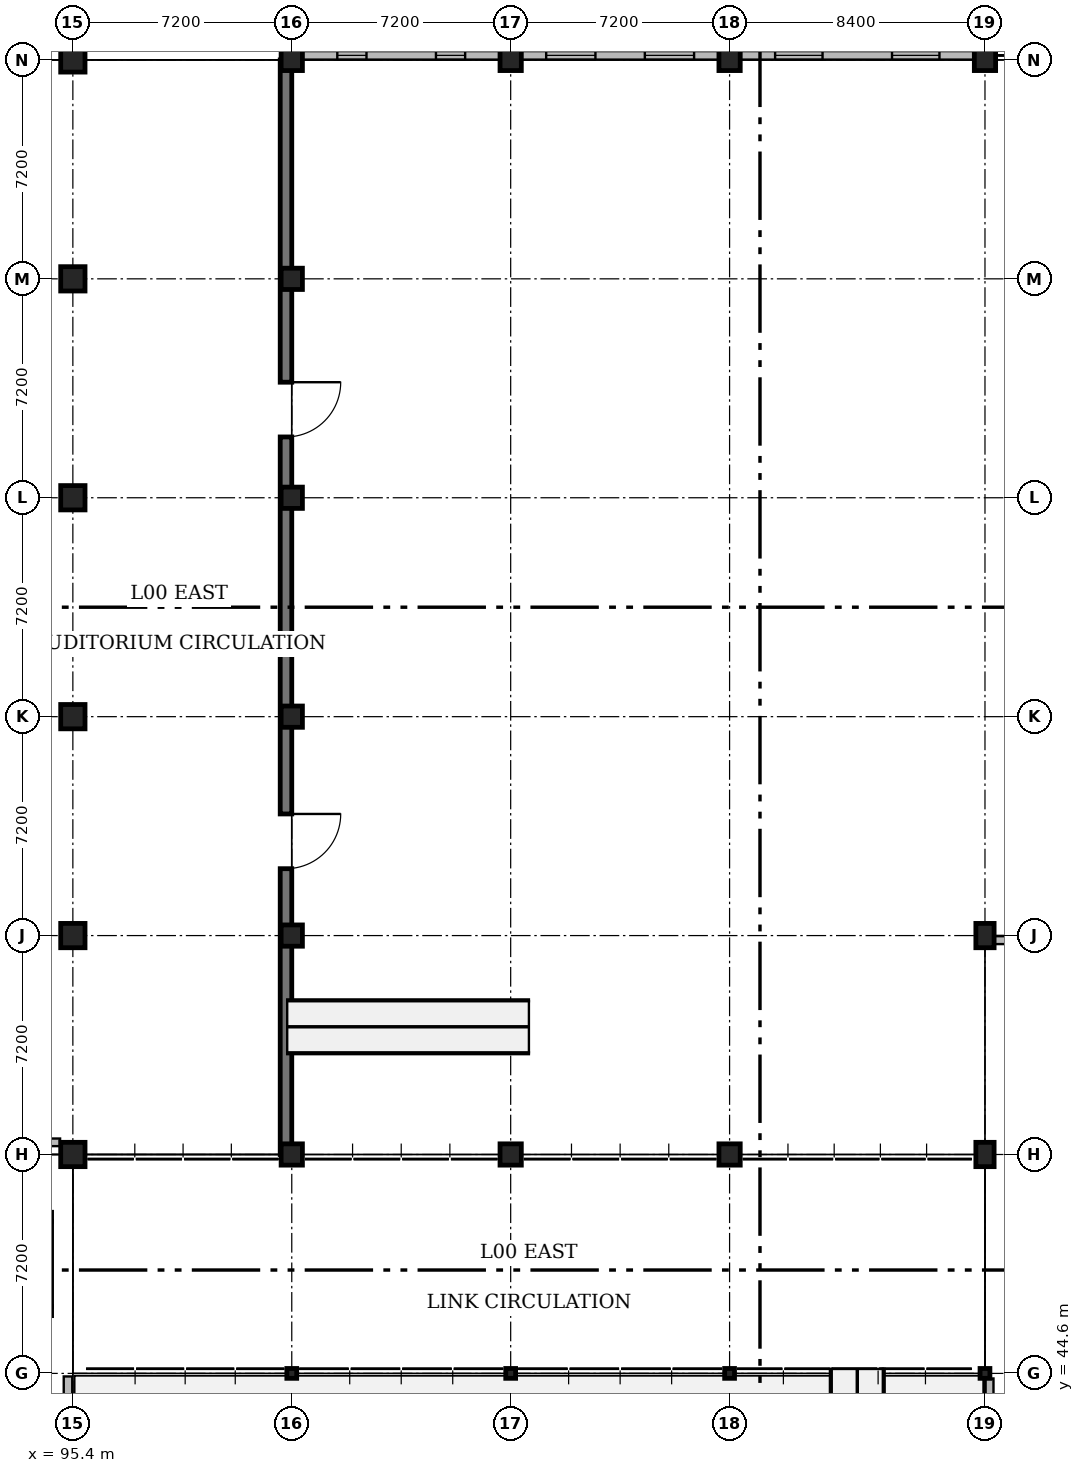
"""IFC4 building model, lengths in metres.
Left out: names, types, materials, properties, quantities, classifications, styles, units other than length and angle.
Written with IfcOpenShell. Run it as: python <this file> out.ifc"""

import sys

from ifc_helpers import new_model, si_unit, direction, frame, frame_2d, origin, origin_2d, place, context, subcontext, project, spatial, rectangle, hollow_circle, extrude, element, fill, save


model = new_model("IFC4")
c1 = context("Model", 3, precision=1e-05, world=origin(), true_north=direction((0.0, 1.0)))
c2 = subcontext(c1, "Body", "Model", "MODEL_VIEW")
j1 = project(units=[si_unit("LENGTHUNIT", "METRE"), si_unit("PLANEANGLEUNIT", "RADIAN")], contexts=[c1])
p1 = place(None, origin())
s1 = spatial("IfcSite", under=j1, at=p1, CompositionType="ELEMENT")
p2 = place(p1, origin())
s2 = spatial("IfcBuilding", under=s1, at=p2, CompositionType="ELEMENT")
p3 = place(p2, origin())
s3 = spatial("IfcBuildingStorey", under=s2, at=p3, CompositionType="ELEMENT", Elevation=0.0)
for number, where, z_axis, x_axis in (
    (1, (95.4, 51.8, 0.0), (0.0, 0.0, 1.0), (1.0, 0.0, 0.0)),
    (2, (95.4, 59.0, 0.0), (0.0, 0.0, 1.0), (1.0, 0.0, 0.0)),
    (3, (95.4, 66.2, 0.0), (0.0, 0.0, 1.0), (1.0, 0.0, 0.0)),
    (4, (95.4, 73.4, 0.0), (0.0, 0.0, 1.0), (1.0, 0.0, 0.0)),
    (5, (95.4, 80.6, 0.0), (0.0, 0.0, 1.0), (1.0, 0.0, 0.0)),
    (6, (95.4, 87.8, 0.0), (0.0, 0.0, 1.0), (1.0, 0.0, 0.0)),
):
    element("IfcColumn", number, at=place(p3, frame(where, z_axis=z_axis, x_axis=x_axis)), inside=s3, PredefinedType="COLUMN", context=c2, shape_type="SweptSolid", body=[
        extrude(rectangle(XDim=0.8, YDim=0.8, at=origin_2d()), origin(), (0.0, 0.0, 1.0), 4.8),
    ])
p4 = place(p3, frame((102.6, 44.6, 0.0), z_axis=(0.0, 0.0, 1.0), x_axis=(1.0, 0.0, 0.0)))
e7 = element("IfcColumn", 7, at=p4, inside=s3, PredefinedType="COLUMN", context=c2, shape_type="SweptSolid", body=[
    extrude(hollow_circle(Radius=0.162, WallThickness=0.012, at=origin_2d()), origin(), (0.0, 0.0, 1.0), 4.8),
])
for number, where, z_axis, x_axis in (
    (8, (102.6, 51.8, 0.0), (0.0, 0.0, 1.0), (1.0, 0.0, 0.0)),
    (9, (102.6, 59.0, 0.0), (0.0, 0.0, 1.0), (1.0, 0.0, 0.0)),
    (10, (102.6, 66.2, 0.0), (0.0, 0.0, 1.0), (1.0, 0.0, 0.0)),
    (11, (102.6, 73.4, 0.0), (0.0, 0.0, 1.0), (1.0, 0.0, 0.0)),
    (12, (102.6, 80.6, 0.0), (0.0, 0.0, 1.0), (1.0, 0.0, 0.0)),
    (13, (102.6, 87.8, 0.0), (0.0, 0.0, 1.0), (1.0, 0.0, 0.0)),
):
    element("IfcColumn", number, at=place(p3, frame(where, z_axis=z_axis, x_axis=x_axis)), inside=s3, PredefinedType="COLUMN", context=c2, shape_type="SweptSolid", body=[
        extrude(rectangle(XDim=0.7, YDim=0.7, at=origin_2d()), origin(), (0.0, 0.0, 1.0), 4.8),
    ])
p5 = place(p3, frame((109.8, 44.6, 0.0), z_axis=(0.0, 0.0, 1.0), x_axis=(1.0, 0.0, 0.0)))
e14 = element("IfcColumn", 14, at=p5, inside=s3, PredefinedType="COLUMN", context=c2, shape_type="SweptSolid", body=[
    extrude(hollow_circle(Radius=0.162, WallThickness=0.012, at=origin_2d()), origin(), (0.0, 0.0, 1.0), 4.8),
])
for number, where, z_axis, x_axis in (
    (15, (109.8, 51.8, 0.0), (0.0, 0.0, 1.0), (1.0, 0.0, 0.0)),
    (16, (109.8, 87.8, 0.0), (0.0, 0.0, 1.0), (1.0, 0.0, 0.0)),
):
    element("IfcColumn", number, at=place(p3, frame(where, z_axis=z_axis, x_axis=x_axis)), inside=s3, PredefinedType="COLUMN", context=c2, shape_type="SweptSolid", body=[
        extrude(rectangle(XDim=0.7, YDim=0.7, at=origin_2d()), origin(), (0.0, 0.0, 1.0), 4.8),
    ])
p6 = place(p3, frame((117.0, 44.6, 0.0), z_axis=(0.0, 0.0, 1.0), x_axis=(1.0, 0.0, 0.0)))
e17 = element("IfcColumn", 17, at=p6, inside=s3, PredefinedType="COLUMN", context=c2, shape_type="SweptSolid", body=[
    extrude(hollow_circle(Radius=0.162, WallThickness=0.012, at=origin_2d()), origin(), (0.0, 0.0, 1.0), 4.8),
])
for number, where, z_axis, x_axis in (
    (18, (117.0, 51.8, 0.0), (0.0, 0.0, 1.0), (1.0, 0.0, 0.0)),
    (19, (117.0, 87.8, 0.0), (0.0, 0.0, 1.0), (1.0, 0.0, 0.0)),
):
    element("IfcColumn", number, at=place(p3, frame(where, z_axis=z_axis, x_axis=x_axis)), inside=s3, PredefinedType="COLUMN", context=c2, shape_type="SweptSolid", body=[
        extrude(rectangle(XDim=0.7, YDim=0.7, at=origin_2d()), origin(), (0.0, 0.0, 1.0), 4.8),
    ])
p7 = place(p3, frame((125.4, 44.6, 0.0), z_axis=(0.0, 0.0, 1.0), x_axis=(1.0, 0.0, 0.0)))
e20 = element("IfcColumn", 20, at=p7, inside=s3, PredefinedType="COLUMN", context=c2, shape_type="SweptSolid", body=[
    extrude(hollow_circle(Radius=0.162, WallThickness=0.012, at=origin_2d()), origin(), (0.0, 0.0, 1.0), 4.8),
])
for number, where, z_axis, x_axis in (
    (21, (125.4, 51.8, 0.0), (0.0, 0.0, 1.0), (1.0, 0.0, 0.0)),
    (22, (125.4, 59.0, 0.0), (0.0, 0.0, 1.0), (1.0, 0.0, 0.0)),
):
    element("IfcColumn", number, at=place(p3, frame(where, z_axis=z_axis, x_axis=x_axis)), inside=s3, PredefinedType="COLUMN", context=c2, shape_type="SweptSolid", body=[
        extrude(rectangle(XDim=0.6, YDim=0.8, at=origin_2d()), origin(), (0.0, 0.0, 1.0), 4.8),
    ])
p8 = place(p3, frame((125.4, 87.8, 0.0), z_axis=(0.0, 0.0, 1.0), x_axis=(1.0, 0.0, 0.0)))
e23 = element("IfcColumn", 23, at=p8, inside=s3, PredefinedType="COLUMN", context=c2, shape_type="SweptSolid", body=[
    extrude(rectangle(XDim=0.7, YDim=0.7, at=origin_2d()), origin(), (0.0, 0.0, 1.0), 4.8),
])
p9 = place(p3, frame((95.24, 37.78, 0.0), z_axis=(0.0, 0.0, 1.0), x_axis=(0.0, 1.0, 0.0)))
e24 = element("IfcWall", 24, at=p9, inside=s3, PredefinedType="SOLIDWALL", context=c2, shape_type="SweptSolid", body=[
    extrude(rectangle(XDim=6.72, YDim=0.28, at=frame_2d((3.36, 0.0))), origin(), (0.0, 0.0, 1.0), 3.323),
])
p10 = place(p9, frame((0.905, 0.0, 0.95)))
e25 = element("IfcOpeningElement", 25, at=p10, cuts=e24, PredefinedType="OPENING", context=c2, shape_type="SweptSolid", body=[
    extrude(rectangle(XDim=1.55, YDim=1.8, at=frame_2d((0.775, 0.9))), frame((0.0, 0.16, 0.0), z_axis=(0.0, -1.0, 0.0), x_axis=(1.0, 0.0, 0.0)), (0.0, 0.0, 1.0), 0.32),
])
p11 = place(p9, frame((4.265, 0.0, 0.95)))
e26 = element("IfcOpeningElement", 26, at=p11, cuts=e24, PredefinedType="OPENING", context=c2, shape_type="SweptSolid", body=[
    extrude(rectangle(XDim=1.55, YDim=1.8, at=frame_2d((0.775, 0.9))), frame((0.0, 0.16, 0.0), z_axis=(0.0, -1.0, 0.0), x_axis=(1.0, 0.0, 0.0)), (0.0, 0.0, 1.0), 0.32),
])
p12 = place(p3, frame((125.705, 58.85, 0.0), z_axis=(0.0, 0.0, 1.0), x_axis=(1.0, 0.0, 0.0)))
e27 = element("IfcWall", 27, at=p12, inside=s3, PredefinedType="SOLIDWALL", context=c2, shape_type="SweptSolid", body=[
    extrude(rectangle(XDim=7.79, YDim=0.26, at=frame_2d((3.895, 0.0))), origin(), (0.0, 0.0, 1.0), 3.873),
])
p13 = place(p12, frame((1.482, 0.0, 0.95)))
e28 = element("IfcOpeningElement", 28, at=p13, cuts=e27, PredefinedType="OPENING", context=c2, shape_type="SweptSolid", body=[
    extrude(rectangle(XDim=0.93, YDim=1.8, at=frame_2d((0.465, 0.9))), frame((0.0, 0.15, 0.0), z_axis=(0.0, -1.0, 0.0), x_axis=(1.0, 0.0, 0.0)), (0.0, 0.0, 1.0), 0.3),
])
p14 = place(p12, frame((5.377, 0.0, 0.95)))
e29 = element("IfcOpeningElement", 29, at=p14, cuts=e27, PredefinedType="OPENING", context=c2, shape_type="SweptSolid", body=[
    extrude(rectangle(XDim=0.93, YDim=1.8, at=frame_2d((0.465, 0.9))), frame((0.0, 0.15, 0.0), z_axis=(0.0, -1.0, 0.0), x_axis=(1.0, 0.0, 0.0)), (0.0, 0.0, 1.0), 0.3),
])
p15 = place(p3, frame((125.55, 37.805, 0.0), z_axis=(0.0, 0.0, 1.0), x_axis=(0.0, 1.0, 0.0)))
e30 = element("IfcWall", 30, at=p15, inside=s3, PredefinedType="SOLIDWALL", context=c2, shape_type="SweptSolid", body=[
    extrude(rectangle(XDim=6.628, YDim=0.26, at=frame_2d((3.314, 0.0))), origin(), (0.0, 0.0, 1.0), 3.873),
])
p16 = place(p15, frame((0.847, 0.0, 0.95)))
e31 = element("IfcOpeningElement", 31, at=p16, cuts=e30, PredefinedType="OPENING", context=c2, shape_type="SweptSolid", body=[
    extrude(rectangle(XDim=1.62, YDim=2.0, at=frame_2d((0.81, 1.0))), frame((0.0, 0.15, 0.0), z_axis=(0.0, -1.0, 0.0), x_axis=(1.0, 0.0, 0.0)), (0.0, 0.0, 1.0), 0.3),
])
p17 = place(p15, frame((4.161, 0.0, 0.95)))
e32 = element("IfcOpeningElement", 32, at=p17, cuts=e30, PredefinedType="OPENING", context=c2, shape_type="SweptSolid", body=[
    extrude(rectangle(XDim=1.62, YDim=2.0, at=frame_2d((0.81, 1.0))), frame((0.0, 0.15, 0.0), z_axis=(0.0, -1.0, 0.0), x_axis=(1.0, 0.0, 0.0)), (0.0, 0.0, 1.0), 0.3),
])
p18 = place(p3, frame((102.41, 87.8, 0.0), z_axis=(0.0, 0.0, 1.0), x_axis=(0.0, -1.0, 0.0)))
e33 = element("IfcWall", 33, at=p18, inside=s3, PredefinedType="SOLIDWALL", context=c2, shape_type="SweptSolid", body=[
    extrude(rectangle(XDim=36.0, YDim=0.38, at=frame_2d((18.0, 0.0))), origin(), (0.0, 0.0, 1.0), 4.54),
])
p19 = place(p18, frame((10.6, 0.0, 0.0)))
e34 = element("IfcOpeningElement", 34, at=p19, cuts=e33, PredefinedType="OPENING", context=c2, shape_type="SweptSolid", body=[
    extrude(rectangle(XDim=1.8, YDim=2.2, at=frame_2d((0.9, 1.1))), frame((0.0, 0.21, 0.0), z_axis=(0.0, -1.0, 0.0), x_axis=(1.0, 0.0, 0.0)), (0.0, 0.0, 1.0), 0.42),
])
p20 = place(p18, frame((24.8, 0.0, 0.0)))
e35 = element("IfcOpeningElement", 35, at=p20, cuts=e33, PredefinedType="OPENING", context=c2, shape_type="SweptSolid", body=[
    extrude(rectangle(XDim=1.8, YDim=2.2, at=frame_2d((0.9, 1.1))), frame((0.0, 0.21, 0.0), z_axis=(0.0, -1.0, 0.0), x_axis=(1.0, 0.0, 0.0)), (0.0, 0.0, 1.0), 0.42),
])
p21 = place(p3, frame((102.955, 87.95, 0.0), z_axis=(0.0, 0.0, 1.0), x_axis=(1.0, 0.0, 0.0)))
e36 = element("IfcWall", 36, at=p21, inside=s3, PredefinedType="SOLIDWALL", context=c2, shape_type="SweptSolid", body=[
    extrude(rectangle(XDim=6.49, YDim=0.28, at=frame_2d((3.245, 0.0))), origin(), (0.0, 0.0, 1.0), 3.873),
])
p22 = place(p21, frame((1.143, 0.0, 0.95)))
e37 = element("IfcOpeningElement", 37, at=p22, cuts=e36, PredefinedType="OPENING", context=c2, shape_type="SweptSolid", body=[
    extrude(rectangle(XDim=0.96, YDim=1.55, at=frame_2d((0.48, 0.775))), frame((0.0, 0.16, 0.0), z_axis=(0.0, -1.0, 0.0), x_axis=(1.0, 0.0, 0.0)), (0.0, 0.0, 1.0), 0.32),
])
p23 = place(p21, frame((4.387, 0.0, 0.95)))
e38 = element("IfcOpeningElement", 38, at=p23, cuts=e36, PredefinedType="OPENING", context=c2, shape_type="SweptSolid", body=[
    extrude(rectangle(XDim=0.96, YDim=1.55, at=frame_2d((0.48, 0.775))), frame((0.0, 0.16, 0.0), z_axis=(0.0, -1.0, 0.0), x_axis=(1.0, 0.0, 0.0)), (0.0, 0.0, 1.0), 0.32),
])
p24 = place(p3, frame((110.155, 87.95, 0.0), z_axis=(0.0, 0.0, 1.0), x_axis=(1.0, 0.0, 0.0)))
e39 = element("IfcWall", 39, at=p24, inside=s3, PredefinedType="SOLIDWALL", context=c2, shape_type="SweptSolid", body=[
    extrude(rectangle(XDim=6.49, YDim=0.28, at=frame_2d((3.245, 0.0))), origin(), (0.0, 0.0, 1.0), 3.873),
])
p25 = place(p24, frame((0.812, 0.0, 0.95)))
e40 = element("IfcOpeningElement", 40, at=p25, cuts=e39, PredefinedType="OPENING", context=c2, shape_type="SweptSolid", body=[
    extrude(rectangle(XDim=1.62, YDim=2.0, at=frame_2d((0.81, 1.0))), frame((0.0, 0.16, 0.0), z_axis=(0.0, -1.0, 0.0), x_axis=(1.0, 0.0, 0.0)), (0.0, 0.0, 1.0), 0.32),
])
p26 = place(p24, frame((4.058, 0.0, 0.95)))
e41 = element("IfcOpeningElement", 41, at=p26, cuts=e39, PredefinedType="OPENING", context=c2, shape_type="SweptSolid", body=[
    extrude(rectangle(XDim=1.62, YDim=2.0, at=frame_2d((0.81, 1.0))), frame((0.0, 0.16, 0.0), z_axis=(0.0, -1.0, 0.0), x_axis=(1.0, 0.0, 0.0)), (0.0, 0.0, 1.0), 0.32),
])
p27 = place(p3, frame((117.355, 87.95, 0.0), z_axis=(0.0, 0.0, 1.0), x_axis=(1.0, 0.0, 0.0)))
e42 = element("IfcWall", 42, at=p27, inside=s3, PredefinedType="SOLIDWALL", context=c2, shape_type="SweptSolid", body=[
    extrude(rectangle(XDim=7.69, YDim=0.28, at=frame_2d((3.845, 0.0))), origin(), (0.0, 0.0, 1.0), 3.873),
])
p28 = place(p27, frame((1.143, 0.0, 0.95)))
e43 = element("IfcOpeningElement", 43, at=p28, cuts=e42, PredefinedType="OPENING", context=c2, shape_type="SweptSolid", body=[
    extrude(rectangle(XDim=1.56, YDim=2.0, at=frame_2d((0.78, 1.0))), frame((0.0, 0.16, 0.0), z_axis=(0.0, -1.0, 0.0), x_axis=(1.0, 0.0, 0.0)), (0.0, 0.0, 1.0), 0.32),
])
p29 = place(p27, frame((4.988, 0.0, 0.95)))
e44 = element("IfcOpeningElement", 44, at=p29, cuts=e42, PredefinedType="OPENING", context=c2, shape_type="SweptSolid", body=[
    extrude(rectangle(XDim=1.56, YDim=2.0, at=frame_2d((0.78, 1.0))), frame((0.0, 0.16, 0.0), z_axis=(0.0, -1.0, 0.0), x_axis=(1.0, 0.0, 0.0)), (0.0, 0.0, 1.0), 0.32),
])
p30 = place(p3, frame((94.98, 52.2, 0.0), z_axis=(0.0, 0.0, 1.0), x_axis=(-1.0, 0.0, 0.0)))
e45 = element("IfcWall", 45, at=p30, inside=s3, PredefinedType="PARTITIONING", context=c2, shape_type="SweptSolid", body=[
    extrude(rectangle(XDim=4.56, YDim=0.25, at=frame_2d((2.28, 0.0))), origin(), (0.0, 0.0, 1.0), 4.54),
])
p31 = place(p30, frame((1.31, 0.0, 0.0)))
e46 = element("IfcOpeningElement", 46, at=p31, cuts=e45, PredefinedType="OPENING", context=c2, shape_type="SweptSolid", body=[
    extrude(rectangle(XDim=1.7, YDim=2.25, at=frame_2d((0.85, 1.125))), frame((0.0, 0.145, 0.0), z_axis=(0.0, -1.0, 0.0), x_axis=(1.0, 0.0, 0.0)), (0.0, 0.0, 1.0), 0.29),
])
p32 = place(p19, origin())
e47 = element("IfcDoor", 47, at=p32, inside=s3, OperationType="SINGLE_SWING_LEFT", PredefinedType="DOOR", context=c2, shape_type="SweptSolid", body=[
    extrude(rectangle(XDim=1.8, YDim=2.2, at=frame_2d((0.9, 1.1))), frame((0.0, 0.025, 0.0), z_axis=(0.0, -1.0, 0.0), x_axis=(1.0, 0.0, 0.0)), (0.0, 0.0, 1.0), 0.05),
])
fill(e34, e47)
p33 = place(p20, origin())
e48 = element("IfcDoor", 48, at=p33, inside=s3, OperationType="SINGLE_SWING_LEFT", PredefinedType="DOOR", context=c2, shape_type="SweptSolid", body=[
    extrude(rectangle(XDim=1.8, YDim=2.2, at=frame_2d((0.9, 1.1))), frame((0.0, 0.025, 0.0), z_axis=(0.0, -1.0, 0.0), x_axis=(1.0, 0.0, 0.0)), (0.0, 0.0, 1.0), 0.05),
])
fill(e35, e48)
p34 = place(p22, origin())
e49 = element("IfcWindow", 49, at=p34, inside=s3, PartitioningType="SINGLE_PANEL", PredefinedType="WINDOW", context=c2, shape_type="SweptSolid", body=[
    extrude(rectangle(XDim=0.96, YDim=1.55, at=frame_2d((0.48, 0.775))), frame((0.0, 0.03, 0.0), z_axis=(0.0, -1.0, 0.0), x_axis=(1.0, 0.0, 0.0)), (0.0, 0.0, 1.0), 0.06),
])
fill(e37, e49)
p35 = place(p23, origin())
e50 = element("IfcWindow", 50, at=p35, inside=s3, PartitioningType="SINGLE_PANEL", PredefinedType="WINDOW", context=c2, shape_type="SweptSolid", body=[
    extrude(rectangle(XDim=0.96, YDim=1.55, at=frame_2d((0.48, 0.775))), frame((0.0, 0.03, 0.0), z_axis=(0.0, -1.0, 0.0), x_axis=(1.0, 0.0, 0.0)), (0.0, 0.0, 1.0), 0.06),
])
fill(e38, e50)
p36 = place(p25, origin())
e51 = element("IfcWindow", 51, at=p36, inside=s3, PartitioningType="SINGLE_PANEL", PredefinedType="WINDOW", context=c2, shape_type="SweptSolid", body=[
    extrude(rectangle(XDim=1.62, YDim=2.0, at=frame_2d((0.81, 1.0))), frame((0.0, 0.03, 0.0), z_axis=(0.0, -1.0, 0.0), x_axis=(1.0, 0.0, 0.0)), (0.0, 0.0, 1.0), 0.06),
])
fill(e40, e51)
p37 = place(p26, origin())
e52 = element("IfcWindow", 52, at=p37, inside=s3, PartitioningType="SINGLE_PANEL", PredefinedType="WINDOW", context=c2, shape_type="SweptSolid", body=[
    extrude(rectangle(XDim=1.62, YDim=2.0, at=frame_2d((0.81, 1.0))), frame((0.0, 0.03, 0.0), z_axis=(0.0, -1.0, 0.0), x_axis=(1.0, 0.0, 0.0)), (0.0, 0.0, 1.0), 0.06),
])
fill(e41, e52)
p38 = place(p28, origin())
e53 = element("IfcWindow", 53, at=p38, inside=s3, PartitioningType="SINGLE_PANEL", PredefinedType="WINDOW", context=c2, shape_type="SweptSolid", body=[
    extrude(rectangle(XDim=1.56, YDim=2.0, at=frame_2d((0.78, 1.0))), frame((0.0, 0.03, 0.0), z_axis=(0.0, -1.0, 0.0), x_axis=(1.0, 0.0, 0.0)), (0.0, 0.0, 1.0), 0.06),
])
fill(e43, e53)
p39 = place(p29, origin())
e54 = element("IfcWindow", 54, at=p39, inside=s3, PartitioningType="SINGLE_PANEL", PredefinedType="WINDOW", context=c2, shape_type="SweptSolid", body=[
    extrude(rectangle(XDim=1.56, YDim=2.0, at=frame_2d((0.78, 1.0))), frame((0.0, 0.03, 0.0), z_axis=(0.0, -1.0, 0.0), x_axis=(1.0, 0.0, 0.0)), (0.0, 0.0, 1.0), 0.06),
])
fill(e44, e54)
save(model, sys.argv[1])
